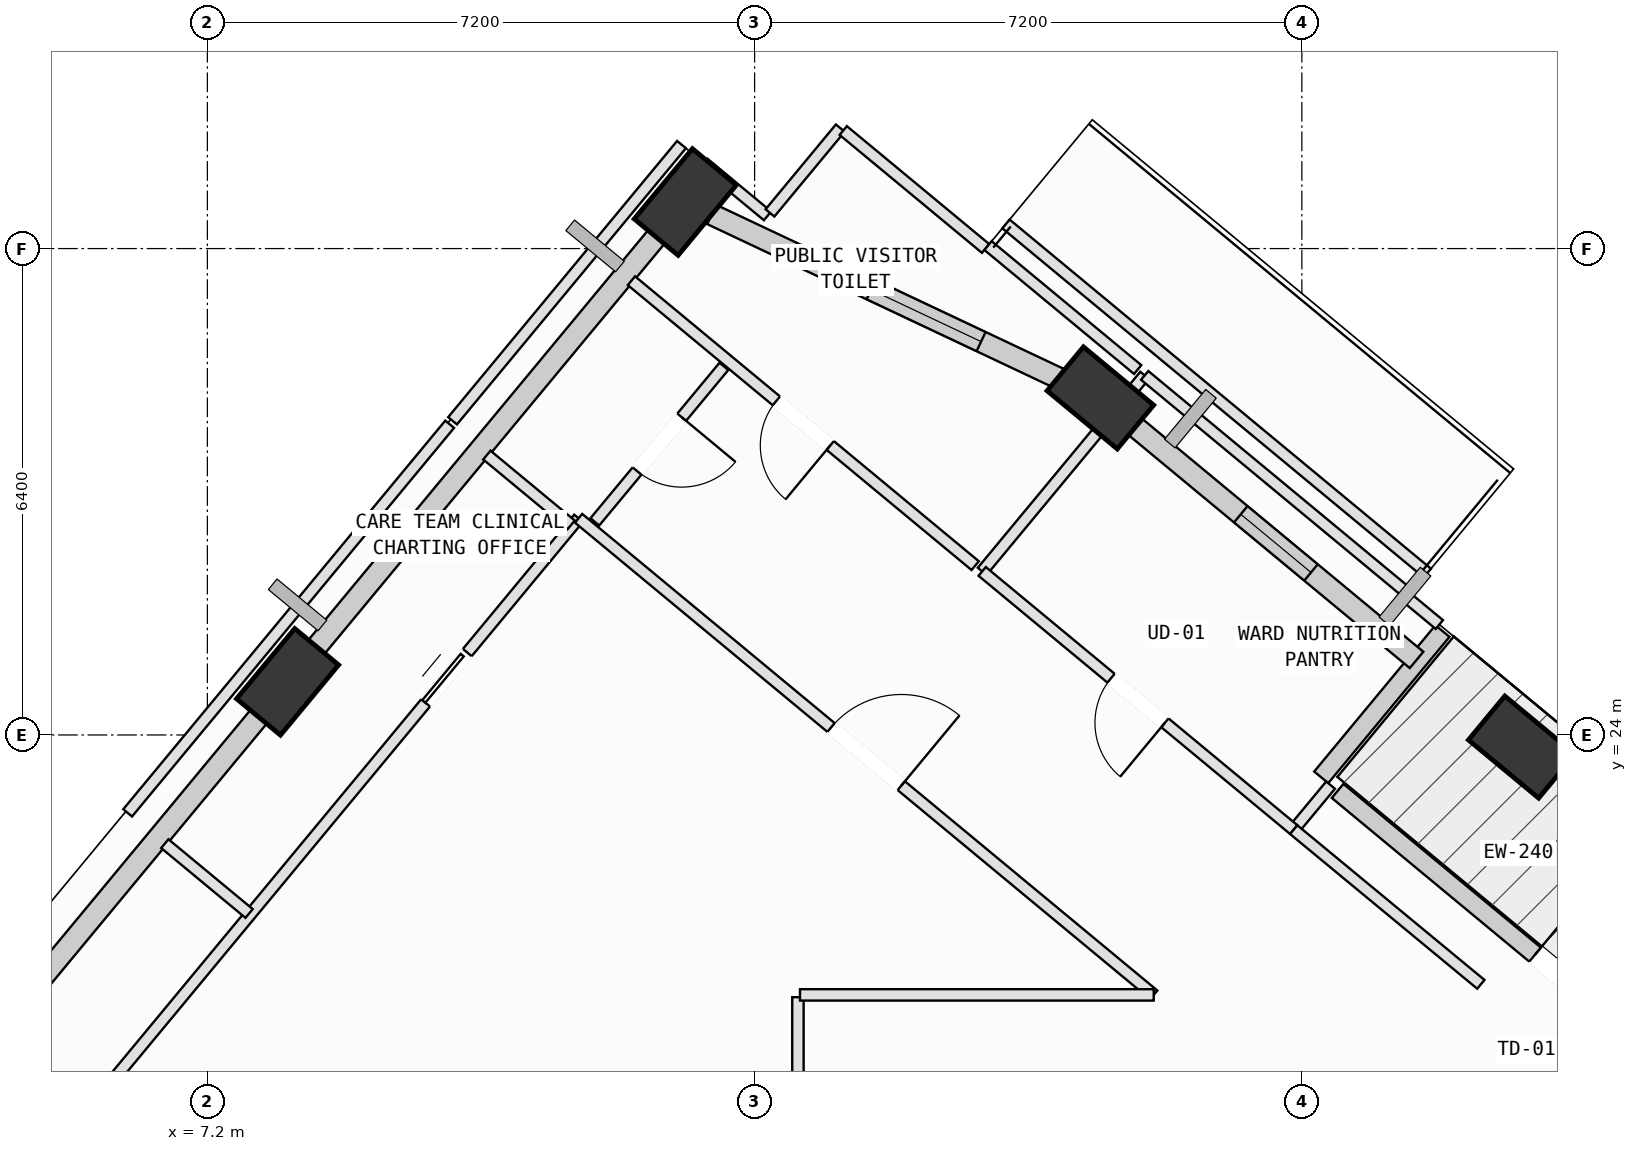
"""IFC4 building model, lengths in metres.
Left out: names, types, materials, properties, quantities, classifications, styles, units other than length and angle.
Written with IfcOpenShell. Run it as: python <this file> out.ifc"""

import sys

from ifc_helpers import new_model, si_unit, direction, frame, frame_2d, origin, origin_2d, place, context, subcontext, project, spatial, rectangle, extrude, element, fill, save


model = new_model("IFC4")
c1 = context("Model", 3, precision=1e-05, world=origin(), true_north=direction((0.0, 1.0)))
c2 = subcontext(c1, "Body", "Model", "MODEL_VIEW")
j1 = project(units=[si_unit("LENGTHUNIT", "METRE"), si_unit("PLANEANGLEUNIT", "RADIAN")], contexts=[c1])
p1 = place(None, origin())
s1 = spatial("IfcSite", under=j1, at=p1, CompositionType="ELEMENT")
p2 = place(p1, origin())
s2 = spatial("IfcBuilding", under=s1, at=p2, CompositionType="ELEMENT")
p3 = place(p2, frame((0.0, 0.0, 239.2)))
s3 = spatial("IfcBuildingStorey", under=s2, at=p3, CompositionType="ELEMENT", Elevation=239.2)
p4 = place(p3, frame((24.493, 23.841, 0.002), z_axis=(0.004334338467, -0.037727058766, 0.999278681123), x_axis=(-0.837702316434, 0.5455892657, 0.024231842548)))
e1 = element("IfcColumn", 1, at=p4, inside=s3, PredefinedType="COLUMN", context=c2, shape_type="SweptSolid", body=[
    extrude(rectangle(XDim=1.2, YDim=0.75, at=origin_2d()), origin(), (0.0, 0.0, 1.0), 3.999),
])
p5 = place(p3, frame((18.949, 28.435, 0.002), z_axis=(-0.014511309746, -0.060728002132, 0.998048862354), x_axis=(-0.600860987721, 0.79836003593, 0.039841265851)))
e2 = element("IfcColumn", 2, at=p5, inside=s3, PredefinedType="COLUMN", context=c2, shape_type="SweptSolid", body=[
    extrude(rectangle(XDim=1.2, YDim=0.75, at=origin_2d()), origin(), (0.0, 0.0, 1.0), 4.004),
])
p6 = place(p3, frame((13.488, 31.013, 0.002), z_axis=(-0.0249525593, -0.0832563442, 0.996215715061), x_axis=(0.831445492483, 0.551561404169, 0.066920926924)))
e3 = element("IfcColumn", 3, at=p6, inside=s3, PredefinedType="COLUMN", context=c2, shape_type="SweptSolid", body=[
    extrude(rectangle(XDim=1.2, YDim=0.75, at=origin_2d()), origin(), (0.0, 0.0, 1.0), 4.011),
])
p7 = place(p3, frame((8.255, 24.699, 0.002), z_axis=(0.00127588751, -0.104501262691, 0.994523935462), x_axis=(0.628700133553, 0.773473420761, 0.080467443393)))
e4 = element("IfcColumn", 4, at=p7, inside=s3, PredefinedType="COLUMN", context=c2, shape_type="SweptSolid", body=[
    extrude(rectangle(XDim=1.2, YDim=0.75, at=origin_2d()), origin(), (0.0, 0.0, 1.0), 4.018),
])
p8 = place(p3, frame((22.07, 23.264, 0.0), z_axis=(0.0, 0.0, 1.0), x_axis=(0.769955085711, -0.638098084928, 0.0)))
e5 = element("IfcWall", 5, at=p8, inside=s3, PredefinedType="SOLIDWALL", context=c2, shape_type="SweptSolid", body=[
    extrude(rectangle(XDim=6.96, YDim=0.24, at=frame_2d((3.48, 0.0))), origin(), (0.0, 0.0, 1.0), 3.265),
])
p9 = place(p8, frame((3.375, 0.0, 0.0)))
e6 = element("IfcOpeningElement", 6, at=p9, cuts=e5, PredefinedType="OPENING", context=c2, shape_type="SweptSolid", body=[
    extrude(rectangle(XDim=1.1, YDim=2.15, at=frame_2d((0.55, 1.075))), frame((0.0, 0.13, 0.0), z_axis=(0.0, -1.0, 0.0), x_axis=(1.0, 0.0, 0.0)), (0.0, 0.0, 1.0), 0.26),
])
p10 = place(p3, frame((23.45, 25.367, 0.0), z_axis=(0.0, 0.0, 1.0), x_axis=(-0.638107200467, -0.769947531142, 0.0)))
e7 = element("IfcWall", 7, at=p10, inside=s3, PredefinedType="SOLIDWALL", context=c2, shape_type="SweptSolid", body=[
    extrude(rectangle(XDim=2.5, YDim=0.24, at=frame_2d((1.25, 0.0))), origin(), (0.0, 0.0, 1.0), 3.265),
])
p11 = place(p3, frame((19.285, 28.156, 0.0), z_axis=(0.0, 0.0, 1.0), x_axis=(0.769971186405, -0.638078656677, 0.0)))
e8 = element("IfcWall", 8, at=p11, inside=s3, PredefinedType="SOLIDWALL", context=c2, shape_type="SweptSolid", body=[
    extrude(rectangle(XDim=4.966, YDim=0.28, at=frame_2d((2.483, 0.0))), origin(), (0.0, 0.0, 1.0), 3.245),
])
p12 = place(p11, frame((1.963, 0.0, 0.75)))
e9 = element("IfcOpeningElement", 9, at=p12, cuts=e8, PredefinedType="OPENING", context=c2, shape_type="SweptSolid", body=[
    extrude(rectangle(XDim=1.2, YDim=1.75, at=frame_2d((0.6, 0.875))), frame((0.0, 0.15, 0.0), z_axis=(0.0, -1.0, 0.0), x_axis=(1.0, 0.0, 0.0)), (0.0, 0.0, 1.0), 0.3),
])
p13 = place(p3, frame((13.835, 30.849, 0.0), z_axis=(0.0, 0.0, 1.0), x_axis=(0.904309874902, -0.426876621701, 0.0)))
e10 = element("IfcWall", 10, at=p13, inside=s3, PredefinedType="SOLIDWALL", context=c2, shape_type="SweptSolid", body=[
    extrude(rectangle(XDim=5.302, YDim=0.28, at=frame_2d((2.651, 0.0))), origin(), (0.0, 0.0, 1.0), 3.265),
])
p14 = place(p13, frame((2.32, 0.0, 0.75)))
e11 = element("IfcOpeningElement", 11, at=p14, cuts=e10, PredefinedType="OPENING", context=c2, shape_type="SweptSolid", body=[
    extrude(rectangle(XDim=1.6, YDim=1.95, at=frame_2d((0.8, 0.975))), frame((0.0, 0.15, 0.0), z_axis=(0.0, -1.0, 0.0), x_axis=(1.0, 0.0, 0.0)), (0.0, 0.0, 1.0), 0.3),
])
p15 = place(p3, frame((8.392, 24.864, 0.0), z_axis=(0.0, 0.0, 1.0), x_axis=(0.63809853285, 0.769954714496, 0.0)))
e12 = element("IfcWall", 12, at=p15, inside=s3, PredefinedType="SOLIDWALL", context=c2, shape_type="SweptSolid", body=[
    extrude(rectangle(XDim=7.434, YDim=0.28, at=frame_2d((3.717, 0.0))), origin(), (0.0, 0.0, 1.0), 3.265),
])
p16 = place(p3, frame((3.139, 18.525, 0.0), z_axis=(0.0, 0.0, 1.0), x_axis=(0.638086936141, 0.7699643251, 0.0)))
e13 = element("IfcWall", 13, at=p16, inside=s3, PredefinedType="SOLIDWALL", context=c2, shape_type="SweptSolid", body=[
    extrude(rectangle(XDim=7.485, YDim=0.28, at=frame_2d((3.742, 0.0))), origin(), (0.0, 0.0, 1.0), 3.265),
])
p17 = place(p3, frame((14.97, 20.55, 0.0), z_axis=(0.0, 0.0, 1.0), x_axis=(0.0, -1.0, 0.0)))
e14 = element("IfcWall", 14, at=p17, inside=s3, PredefinedType="PARTITIONING", context=c2, shape_type="SweptSolid", body=[
    extrude(rectangle(XDim=2.32, YDim=0.15, at=frame_2d((1.16, 0.0))), origin(), (0.0, 0.0, 1.0), 3.78),
])
p18 = place(p3, frame((3.616, 16.633, 0.0), z_axis=(0.0, 0.0, 1.0), x_axis=(0.638092036578, 0.769960098223, 0.0)))
e15 = element("IfcWall", 15, at=p18, inside=s3, PredefinedType="PARTITIONING", context=c2, shape_type="SweptSolid", body=[
    extrude(rectangle(XDim=13.271, YDim=0.15, at=frame_2d((6.635, 0.0))), origin(), (0.0, 0.0, 1.0), 3.78),
])
p19 = place(p18, frame((10.116, 0.0, 0.0)))
e16 = element("IfcOpeningElement", 16, at=p19, cuts=e15, PredefinedType="OPENING", context=c2, shape_type="SweptSolid", body=[
    extrude(rectangle(XDim=0.86, YDim=2.06, at=frame_2d((0.43, 1.03))), frame((0.0, 0.085, 0.0), z_axis=(0.0, -1.0, 0.0), x_axis=(1.0, 0.0, 0.0)), (0.0, 0.0, 1.0), 0.17),
])
p20 = place(p3, frame((12.084, 26.851, 0.0), z_axis=(0.0, 0.0, 1.0), x_axis=(0.769957395503, -0.638095297828, 0.0)))
e17 = element("IfcWall", 17, at=p20, inside=s3, PredefinedType="PARTITIONING", context=c2, shape_type="SweptSolid", body=[
    extrude(rectangle(XDim=9.828, YDim=0.15, at=frame_2d((4.914, 0.0))), origin(), (0.0, 0.0, 1.0), 3.415),
])
p21 = place(p20, frame((4.314, 0.0, 0.0)))
e18 = element("IfcOpeningElement", 18, at=p21, cuts=e17, PredefinedType="OPENING", context=c2, shape_type="SweptSolid", body=[
    extrude(rectangle(XDim=1.2, YDim=2.15, at=frame_2d((0.6, 1.075))), frame((0.0, 0.085, 0.0), z_axis=(0.0, -1.0, 0.0), x_axis=(1.0, 0.0, 0.0)), (0.0, 0.0, 1.0), 0.17),
])
p22 = place(p3, frame((19.651, 20.58, 0.0), z_axis=(0.0, 0.0, 1.0), x_axis=(-1.0, 0.0, 0.0)))
e19 = element("IfcWall", 19, at=p22, inside=s3, PredefinedType="PARTITIONING", context=c2, shape_type="SweptSolid", body=[
    extrude(rectangle(XDim=4.654, YDim=0.15, at=frame_2d((2.327, 0.0))), origin(), (0.0, 0.0, 1.0), 3.78),
])
p23 = place(p3, frame((17.394, 26.152, 0.0), z_axis=(0.0, 0.0, 1.0), x_axis=(0.638225268777, 0.769849664736, 0.0)))
e20 = element("IfcWall", 20, at=p23, inside=s3, PredefinedType="PARTITIONING", context=c2, shape_type="SweptSolid", body=[
    extrude(rectangle(XDim=3.35, YDim=0.15, at=frame_2d((1.675, 0.0))), origin(), (0.0, 0.0, 1.0), 3.78),
])
p24 = place(p3, frame((19.532, 28.731, 0.0), z_axis=(0.0, 0.0, 1.0), x_axis=(0.770005650355, -0.638037066651, 0.0)))
e21 = element("IfcWall", 21, at=p24, inside=s3, PredefinedType="PARTITIONING", context=c2, shape_type="SweptSolid", body=[
    extrude(rectangle(XDim=4.523, YDim=0.15, at=frame_2d((2.262, 0.0))), origin(), (0.0, 0.0, 1.0), 3.78),
])
p25 = place(p3, frame((22.983, 25.806, 0.0), z_axis=(0.0, 0.0, 1.0), x_axis=(0.769990590964, -0.63805524042, 0.0)))
e22 = element("IfcWall", 22, at=p25, inside=s3, PredefinedType="PARTITIONING", context=c2, shape_type="SweptSolid", body=[
    extrude(rectangle(XDim=0.553, YDim=0.15, at=frame_2d((0.277, 0.0))), origin(), (0.0, 0.0, 1.0), 3.78),
])
p26 = place(p3, frame((21.978, 23.34, 0.0), z_axis=(0.0, 0.0, 1.0), x_axis=(-0.638191965437, -0.76987727285, 0.0)))
e23 = element("IfcWall", 23, at=p26, inside=s3, PredefinedType="PARTITIONING", context=c2, shape_type="SweptSolid", body=[
    extrude(rectangle(XDim=0.76, YDim=0.15, at=frame_2d((0.38, 0.0))), origin(), (0.0, 0.0, 1.0), 3.78),
])
p27 = place(p3, frame((21.493, 22.755, 0.0), z_axis=(0.0, 0.0, 1.0), x_axis=(-0.769928857857, 0.638129731198, 0.0)))
e24 = element("IfcWall", 24, at=p27, inside=s3, PredefinedType="PARTITIONING", context=c2, shape_type="SweptSolid", body=[
    extrude(rectangle(XDim=5.324, YDim=0.15, at=frame_2d((2.662, 0.0))), origin(), (0.0, 0.0, 1.0), 3.78),
])
p28 = place(p27, frame((2.202, 0.0, 0.0)))
e25 = element("IfcOpeningElement", 25, at=p28, cuts=e24, PredefinedType="OPENING", context=c2, shape_type="SweptSolid", body=[
    extrude(rectangle(XDim=0.92, YDim=2.1, at=frame_2d((0.46, 1.05))), frame((0.0, 0.085, 0.0), z_axis=(0.0, -1.0, 0.0), x_axis=(1.0, 0.0, 0.0)), (0.0, 0.0, 1.0), 0.17),
])
p29 = place(p3, frame((17.302, 26.228, 0.0), z_axis=(0.0, 0.0, 1.0), x_axis=(-0.769901379384, 0.638162883614, 0.0)))
e26 = element("IfcWall", 26, at=p29, inside=s3, PredefinedType="PARTITIONING", context=c2, shape_type="SweptSolid", body=[
    extrude(rectangle(XDim=5.875, YDim=0.15, at=frame_2d((2.938, 0.0))), origin(), (0.0, 0.0, 1.0), 3.78),
])
p30 = place(p29, frame((2.477, 0.0, 0.0)))
e27 = element("IfcOpeningElement", 27, at=p30, cuts=e26, PredefinedType="OPENING", context=c2, shape_type="SweptSolid", body=[
    extrude(rectangle(XDim=0.92, YDim=2.1, at=frame_2d((0.46, 1.05))), frame((0.0, 0.085, 0.0), z_axis=(0.0, -1.0, 0.0), x_axis=(1.0, 0.0, 0.0)), (0.0, 0.0, 1.0), 0.17),
])
p31 = place(p3, frame((12.989, 30.709, 0.0), z_axis=(0.0, 0.0, 1.0), x_axis=(0.637653834222, 0.770323041134, 0.0)))
e28 = element("IfcWall", 28, at=p31, inside=s3, PredefinedType="PARTITIONING", context=c2, shape_type="SweptSolid", body=[
    extrude(rectangle(XDim=1.102, YDim=0.15, at=frame_2d((0.551, 0.0))), origin(), (0.0, 0.0, 1.0), 3.265),
])
p32 = place(p3, frame((13.73, 31.526, 0.0), z_axis=(0.0, 0.0, 1.0), x_axis=(0.770144070262, -0.637869979729, 0.0)))
e29 = element("IfcWall", 29, at=p32, inside=s3, PredefinedType="PARTITIONING", context=c2, shape_type="SweptSolid", body=[
    extrude(rectangle(XDim=1.091, YDim=0.15, at=frame_2d((0.545, 0.0))), origin(), (0.0, 0.0, 1.0), 3.78),
])
p33 = place(p3, frame((14.602, 30.869, 0.0), z_axis=(0.0, 0.0, 1.0), x_axis=(0.638094891958, 0.769957731864, 0.0)))
e30 = element("IfcWall", 30, at=p33, inside=s3, PredefinedType="PARTITIONING", context=c2, shape_type="SweptSolid", body=[
    extrude(rectangle(XDim=1.45, YDim=0.15, at=frame_2d((0.725, 0.0))), origin(), (0.0, 0.0, 1.0), 3.78),
])
p34 = place(p3, frame((15.566, 31.953, 0.0), z_axis=(0.0, 0.0, 1.0), x_axis=(0.770011699053, -0.638029766799, 0.0)))
e31 = element("IfcWall", 31, at=p34, inside=s3, PredefinedType="PARTITIONING", context=c2, shape_type="SweptSolid", body=[
    extrude(rectangle(XDim=2.432, YDim=0.15, at=frame_2d((1.216, 0.0))), origin(), (0.0, 0.0, 1.0), 3.78),
])
p35 = place(p3, frame((17.471, 30.439, 0.0), z_axis=(0.0, 0.0, 1.0), x_axis=(0.770135481585, -0.637880349285, 0.0)))
e32 = element("IfcWall", 32, at=p35, inside=s3, PredefinedType="PARTITIONING", context=c2, shape_type="SweptSolid", body=[
    extrude(rectangle(XDim=2.557, YDim=0.15, at=frame_2d((1.278, 0.0))), origin(), (0.0, 0.0, 1.0), 3.78),
])
p36 = place(p3, frame((6.151, 22.975, 0.0), z_axis=(0.0, 0.0, 1.0), x_axis=(0.638084508514, 0.769966336923, 0.0)))
e33 = element("IfcWall", 33, at=p36, inside=s3, PredefinedType="PARTITIONING", context=c2, shape_type="SweptSolid", body=[
    extrude(rectangle(XDim=6.64, YDim=0.15, at=frame_2d((3.32, 0.0))), origin(), (0.0, 0.0, 1.0), 3.78),
])
for number, where, z_axis, x_axis in (
    (34, (10.877, 27.683, 0.0), (0.0, 0.0, 1.0), (0.77, -0.638, 0.0)),
    (35, (7.749, 21.651, 0.0), (0.0, 0.0, 1.0), (-0.77, 0.638, 0.0)),
):
    element("IfcWall", number, at=place(p3, frame(where, z_axis=z_axis, x_axis=x_axis)), inside=s3, PredefinedType="PARTITIONING", context=c2, shape_type="SweptSolid", body=[
        extrude(rectangle(XDim=1.44, YDim=0.15, at=frame_2d((0.72, 0.0))), origin(), (0.0, 0.0, 1.0), 3.78),
    ])
p37 = place(p3, frame((13.996, 28.85, 0.0), z_axis=(0.0, 0.0, 1.0), x_axis=(-0.63860255036, -0.769536732504, 0.0)))
e36 = element("IfcWall", 36, at=p37, inside=s3, PredefinedType="PARTITIONING", context=c2, shape_type="SweptSolid", body=[
    extrude(rectangle(XDim=2.659, YDim=0.15, at=frame_2d((1.33, 0.0))), origin(), (0.0, 0.0, 1.0), 3.78),
])
p38 = place(p37, frame((0.869, 0.0, 0.0)))
e37 = element("IfcOpeningElement", 37, at=p38, cuts=e36, PredefinedType="OPENING", context=c2, shape_type="SweptSolid", body=[
    extrude(rectangle(XDim=0.92, YDim=2.1, at=frame_2d((0.46, 1.05))), frame((0.0, 0.085, 0.0), z_axis=(0.0, -1.0, 0.0), x_axis=(1.0, 0.0, 0.0)), (0.0, 0.0, 1.0), 0.17),
])
p39 = place(p3, frame((10.426, 28.134, 0.0), z_axis=(0.0, 0.0, 1.0), x_axis=(0.638131773023, 0.769927165554, 0.0)))
e38 = element("IfcWall", 38, at=p39, inside=s3, PredefinedType="PARTITIONING", context=c2, shape_type="SweptSolid", body=[
    extrude(rectangle(XDim=4.72, YDim=0.15, at=frame_2d((2.36, 0.0))), origin(), (0.0, 0.0, 1.0), 3.78),
])
p40 = place(p3, frame((17.707, 30.724, 0.0), z_axis=(0.0, 0.0, 1.0), x_axis=(0.769974915314, -0.638074156966, 0.0)))
e39 = element("IfcWall", 39, at=p40, inside=s3, PredefinedType="PARTITIONING", context=c2, shape_type="SweptSolid", body=[
    extrude(rectangle(XDim=7.2, YDim=0.15, at=frame_2d((3.6, 0.0))), origin(), (0.0, 0.0, 1.0), 3.78),
])
p41 = place(p3, frame((21.493, 22.754, 0.0), z_axis=(0.0, 0.0, 1.0), x_axis=(0.770814878989, -0.63705919845, 0.0)))
e40 = element("IfcWall", 40, at=p41, inside=s3, PredefinedType="PARTITIONING", context=c2, shape_type="SweptSolid", body=[
    extrude(rectangle(XDim=3.194, YDim=0.15, at=frame_2d((1.597, 0.0))), origin(), (0.0, 0.0, 1.0), 3.415),
])
p42 = place(p9, origin())
e41 = element("IfcDoor", 41, at=p42, inside=s3, OperationType="SINGLE_SWING_LEFT", PredefinedType="DOOR", context=c2, shape_type="SweptSolid", body=[
    extrude(rectangle(XDim=1.1, YDim=2.15, at=frame_2d((0.55, 1.075))), frame((0.0, 0.025, 0.0), z_axis=(0.0, -1.0, 0.0), x_axis=(1.0, 0.0, 0.0)), (0.0, 0.0, 1.0), 0.05),
])
fill(e6, e41)
p43 = place(p12, origin())
e42 = element("IfcWindow", 42, at=p43, inside=s3, PartitioningType="SINGLE_PANEL", PredefinedType="WINDOW", context=c2, shape_type="SweptSolid", body=[
    extrude(rectangle(XDim=1.2, YDim=1.75, at=frame_2d((0.6, 0.875))), frame((0.0, 0.03, 0.0), z_axis=(0.0, -1.0, 0.0), x_axis=(1.0, 0.0, 0.0)), (0.0, 0.0, 1.0), 0.06),
])
fill(e9, e42)
p44 = place(p14, origin())
e43 = element("IfcWindow", 43, at=p44, inside=s3, PartitioningType="SINGLE_PANEL", PredefinedType="WINDOW", context=c2, shape_type="SweptSolid", body=[
    extrude(rectangle(XDim=1.6, YDim=1.95, at=frame_2d((0.8, 0.975))), frame((0.0, 0.03, 0.0), z_axis=(0.0, -1.0, 0.0), x_axis=(1.0, 0.0, 0.0)), (0.0, 0.0, 1.0), 0.06),
])
fill(e11, e43)
p45 = place(p21, origin())
e44 = element("IfcDoor", 44, at=p45, inside=s3, OperationType="SINGLE_SWING_RIGHT", PredefinedType="DOOR", context=c2, shape_type="SweptSolid", body=[
    extrude(rectangle(XDim=1.2, YDim=2.15, at=frame_2d((0.6, 1.075))), frame((0.0, 0.025, 0.0), z_axis=(0.0, -1.0, 0.0), x_axis=(1.0, 0.0, 0.0)), (0.0, 0.0, 1.0), 0.05),
])
fill(e18, e44)
p46 = place(p28, origin())
e45 = element("IfcDoor", 45, at=p46, inside=s3, OperationType="SINGLE_SWING_LEFT", PredefinedType="DOOR", context=c2, shape_type="SweptSolid", body=[
    extrude(rectangle(XDim=0.92, YDim=2.1, at=frame_2d((0.46, 1.05))), frame((0.0, 0.025, 0.0), z_axis=(0.0, -1.0, 0.0), x_axis=(1.0, 0.0, 0.0)), (0.0, 0.0, 1.0), 0.05),
])
fill(e25, e45)
p47 = place(p30, origin())
e46 = element("IfcDoor", 46, at=p47, inside=s3, OperationType="SINGLE_SWING_LEFT", PredefinedType="DOOR", context=c2, shape_type="SweptSolid", body=[
    extrude(rectangle(XDim=0.92, YDim=2.1, at=frame_2d((0.46, 1.05))), frame((0.0, 0.025, 0.0), z_axis=(0.0, -1.0, 0.0), x_axis=(1.0, 0.0, 0.0)), (0.0, 0.0, 1.0), 0.05),
])
fill(e27, e46)
p48 = place(p38, origin())
e47 = element("IfcDoor", 47, at=p48, inside=s3, OperationType="SINGLE_SWING_LEFT", PredefinedType="DOOR", context=c2, shape_type="SweptSolid", body=[
    extrude(rectangle(XDim=0.92, YDim=2.1, at=frame_2d((0.46, 1.05))), frame((0.0, 0.025, 0.0), z_axis=(0.0, -1.0, 0.0), x_axis=(1.0, 0.0, 0.0)), (0.0, 0.0, 1.0), 0.05),
])
fill(e37, e47)
p49 = place(p19, origin())
e48 = element("IfcDoor", 48, at=p49, inside=s3, OperationType="SLIDING_TO_LEFT", PredefinedType="DOOR", context=c2, shape_type="SweptSolid", body=[
    extrude(rectangle(XDim=0.86, YDim=2.06, at=frame_2d((0.43, 1.03))), frame((0.0, 0.025, 0.0), z_axis=(0.0, -1.0, 0.0), x_axis=(1.0, 0.0, 0.0)), (0.0, 0.0, 1.0), 0.05),
])
fill(e16, e48)
save(model, sys.argv[1])
